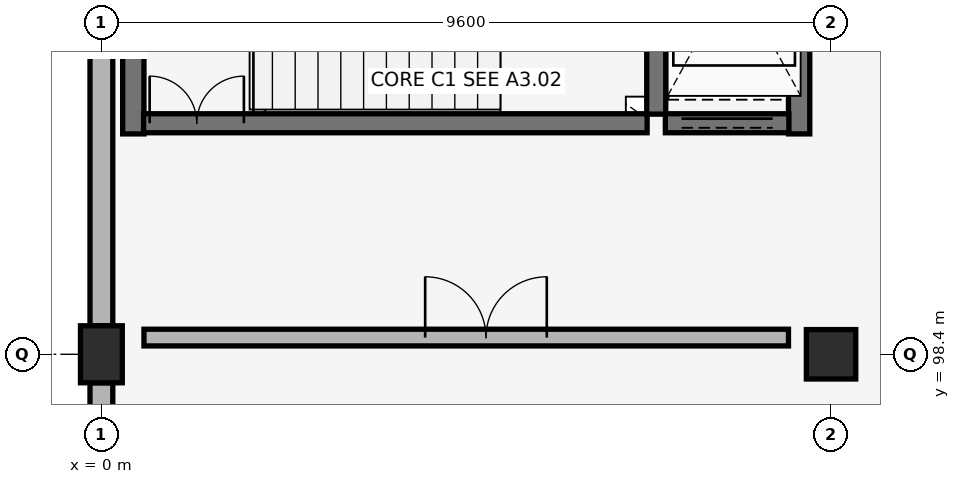
"""IFC4 building model, lengths in metres.
Left out: names, types, materials, properties, quantities, classifications, styles, units other than length and angle.
Written with IfcOpenShell. Run it as: python <this file> out.ifc"""

import sys

from ifc_helpers import new_model, si_unit, direction, frame, frame_2d, origin, origin_2d, place, context, subcontext, project, spatial, rectangle, extrude, element, fill, save


model = new_model("IFC4")
c1 = context("Model", 3, precision=1e-05, world=origin(), true_north=direction((0.0, 1.0)))
c2 = subcontext(c1, "Body", "Model", "MODEL_VIEW")
j1 = project(units=[si_unit("LENGTHUNIT", "METRE"), si_unit("PLANEANGLEUNIT", "RADIAN")], contexts=[c1])
p1 = place(None, origin())
s1 = spatial("IfcSite", under=j1, at=p1, CompositionType="ELEMENT")
p2 = place(p1, origin())
s2 = spatial("IfcBuilding", under=s1, at=p2, CompositionType="ELEMENT")
p3 = place(p2, frame((0.0, 0.0, 12.58)))
s3 = spatial("IfcBuildingStorey", under=s2, at=p3, CompositionType="ELEMENT", Elevation=12.58)
p4 = place(p3, frame((0.0, 98.4, 0.0), z_axis=(0.0, 0.0, 1.0), x_axis=(1.0, 0.0, 0.0)))
e1 = element("IfcColumn", 1, at=p4, inside=s3, PredefinedType="COLUMN", context=c2, shape_type="SweptSolid", body=[
    extrude(rectangle(XDim=0.55, YDim=0.75, at=origin_2d()), origin(), (0.0, 0.0, 1.0), 4.08),
])
p5 = place(p3, frame((9.6, 98.4, 0.0), z_axis=(0.0, 0.0, 1.0), x_axis=(1.0, 0.0, 0.0)))
e2 = element("IfcColumn", 2, at=p5, inside=s3, PredefinedType="COLUMN", context=c2, shape_type="SweptSolid", body=[
    extrude(rectangle(XDim=0.65, YDim=0.65, at=origin_2d()), origin(), (0.0, 0.0, 1.0), 4.08),
])
p6 = place(p3, frame((0.0, 98.025, 0.0), z_axis=(0.0, 0.0, 1.0), x_axis=(0.0, -1.0, 0.0)))
e3 = element("IfcWall", 3, at=p6, inside=s3, PredefinedType="SOLIDWALL", context=c2, shape_type="SweptSolid", body=[
    extrude(rectangle(XDim=6.45, YDim=0.3, at=frame_2d((3.225, 0.0))), origin(), (0.0, 0.0, 1.0), 3.08),
])
p7 = place(p3, frame((0.0, 105.225, 0.0), z_axis=(0.0, 0.0, 1.0), x_axis=(0.0, -1.0, 0.0)))
e4 = element("IfcWall", 4, at=p7, inside=s3, PredefinedType="SOLIDWALL", context=c2, shape_type="SweptSolid", body=[
    extrude(rectangle(XDim=6.45, YDim=0.3, at=frame_2d((3.225, 0.0))), origin(), (0.0, 0.0, 1.0), 3.08),
])
for number, where, z_axis, x_axis in (
    (5, (0.42, 101.3, 0.0), (0.0, 0.0, 1.0), (0.0, 1.0, 0.0)),
    (6, (9.18, 101.3, 0.0), (0.0, 0.0, 1.0), (0.0, 1.0, 0.0)),
):
    element("IfcWall", number, at=place(p3, frame(where, z_axis=z_axis, x_axis=x_axis)), inside=s3, PredefinedType="SHEAR", context=c2, shape_type="SweptSolid", body=[
        extrude(rectangle(XDim=4.08, YDim=0.28, at=frame_2d((2.04, 0.0))), origin(), (0.0, 0.0, 1.0), 3.8),
    ])
p8 = place(p3, frame((7.3, 101.56, 0.0), z_axis=(0.0, 0.0, 1.0), x_axis=(0.0, 1.0, 0.0)))
e7 = element("IfcWall", 7, at=p8, inside=s3, PredefinedType="SHEAR", context=c2, shape_type="SweptSolid", body=[
    extrude(rectangle(XDim=3.54, YDim=0.25, at=frame_2d((1.77, 0.0))), origin(), (0.0, 0.0, 1.0), 3.8),
])
p9 = place(p3, frame((0.555, 101.44, 0.0), z_axis=(0.0, 0.0, 1.0), x_axis=(1.0, 0.0, 0.0)))
e8 = element("IfcWall", 8, at=p9, inside=s3, PredefinedType="SHEAR", context=c2, shape_type="SweptSolid", body=[
    extrude(rectangle(XDim=6.625, YDim=0.25, at=frame_2d((3.312, 0.0))), origin(), (0.0, 0.0, 1.0), 3.8),
])
p10 = place(p9, frame((0.08, 0.0, 0.0)))
e9 = element("IfcOpeningElement", 9, at=p10, cuts=e8, PredefinedType="OPENING", context=c2, shape_type="SweptSolid", body=[
    extrude(rectangle(XDim=1.24, YDim=2.15, at=frame_2d((0.62, 1.075))), frame((0.0, 0.135, 0.0), z_axis=(0.0, -1.0, 0.0), x_axis=(1.0, 0.0, 0.0)), (0.0, 0.0, 1.0), 0.27),
])
p11 = place(p3, frame((0.56, 98.62, 0.0), z_axis=(0.0, 0.0, 1.0), x_axis=(1.0, 0.0, 0.0)))
e10 = element("IfcWall", 10, at=p11, inside=s3, PredefinedType="PARTITIONING", context=c2, shape_type="SweptSolid", body=[
    extrude(rectangle(XDim=8.48, YDim=0.22, at=frame_2d((4.24, 0.0))), origin(), (0.0, 0.0, 1.0), 3.13),
])
p12 = place(p11, frame((3.7, 0.0, 0.0)))
e11 = element("IfcOpeningElement", 11, at=p12, cuts=e10, PredefinedType="OPENING", context=c2, shape_type="SweptSolid", body=[
    extrude(rectangle(XDim=1.6, YDim=2.2, at=frame_2d((0.8, 1.1))), frame((0.0, 0.12, 0.0), z_axis=(0.0, -1.0, 0.0), x_axis=(1.0, 0.0, 0.0)), (0.0, 0.0, 1.0), 0.24),
])
p13 = place(p3, frame((7.42, 101.44, 0.0), z_axis=(0.0, 0.0, 1.0), x_axis=(1.0, 0.0, 0.0)))
e12 = element("IfcWall", 12, at=p13, inside=s3, PredefinedType="SHEAR", context=c2, shape_type="SweptSolid", body=[
    extrude(rectangle(XDim=1.625, YDim=0.25, at=frame_2d((0.812, 0.0))), origin(), (0.0, 0.0, 1.0), 3.8),
])
p14 = place(p13, frame((0.212, 0.0, 0.0)))
e13 = element("IfcOpeningElement", 13, at=p14, cuts=e12, PredefinedType="OPENING", context=c2, shape_type="SweptSolid", body=[
    extrude(rectangle(XDim=1.2, YDim=2.15, at=frame_2d((0.6, 1.075))), frame((0.0, 0.135, 0.0), z_axis=(0.0, -1.0, 0.0), x_axis=(1.0, 0.0, 0.0)), (0.0, 0.0, 1.0), 0.27),
])
p15 = place(p10, origin())
e14 = element("IfcDoor", 14, at=p15, inside=s3, OperationType="DOUBLE_DOOR_SINGLE_SWING", PredefinedType="DOOR", context=c2, shape_type="SweptSolid", body=[
    extrude(rectangle(XDim=1.24, YDim=2.15, at=frame_2d((0.62, 1.075))), frame((0.0, 0.025, 0.0), z_axis=(0.0, -1.0, 0.0), x_axis=(1.0, 0.0, 0.0)), (0.0, 0.0, 1.0), 0.05),
])
fill(e9, e14)
p16 = place(p12, origin())
e15 = element("IfcDoor", 15, at=p16, inside=s3, OperationType="DOUBLE_DOOR_SINGLE_SWING", PredefinedType="DOOR", context=c2, shape_type="SweptSolid", body=[
    extrude(rectangle(XDim=1.6, YDim=2.2, at=frame_2d((0.8, 1.1))), frame((0.0, 0.025, 0.0), z_axis=(0.0, -1.0, 0.0), x_axis=(1.0, 0.0, 0.0)), (0.0, 0.0, 1.0), 0.05),
])
fill(e11, e15)
p17 = place(p14, origin())
e16 = element("IfcDoor", 16, at=p17, inside=s3, OperationType="DOUBLE_DOOR_SLIDING", PredefinedType="DOOR", context=c2, shape_type="SweptSolid", body=[
    extrude(rectangle(XDim=1.2, YDim=2.15, at=frame_2d((0.6, 1.075))), frame((0.0, 0.025, 0.0), z_axis=(0.0, -1.0, 0.0), x_axis=(1.0, 0.0, 0.0)), (0.0, 0.0, 1.0), 0.05),
])
fill(e13, e16)
save(model, sys.argv[1])
